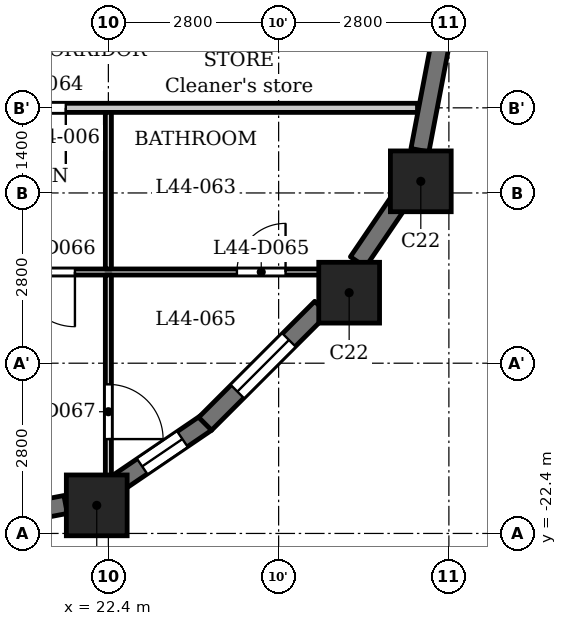
"""IFC4 building model, lengths in metres.
Left out: names, types, materials, properties, quantities, classifications, styles, units other than length and angle.
Written with IfcOpenShell. Run it as: python <this file> out.ifc"""

import sys

from ifc_helpers import new_model, si_unit, direction, frame, frame_2d, origin, origin_2d, place, context, subcontext, project, spatial, rectangle, extrude, element, fill, save


model = new_model("IFC4")
c1 = context("Model", 3, precision=1e-05, world=origin(), true_north=direction((0.0, 1.0)))
c2 = subcontext(c1, "Body", "Model", "MODEL_VIEW")
j1 = project(units=[si_unit("LENGTHUNIT", "METRE"), si_unit("PLANEANGLEUNIT", "RADIAN")], contexts=[c1])
p1 = place(None, origin())
s1 = spatial("IfcSite", under=j1, at=p1, CompositionType="ELEMENT")
p2 = place(p1, origin())
s2 = spatial("IfcBuilding", under=s1, at=p2, CompositionType="ELEMENT")
p3 = place(p2, frame((0.0, 0.0, 171.1)))
s3 = spatial("IfcBuildingStorey", under=s2, at=p3, CompositionType="ELEMENT", Elevation=171.1)
for number, where, z_axis, x_axis in (
    (1, (22.209, -21.938, 0.0), (0.0, 0.0, 1.0), (1.0, 0.0, 0.0)),
    (2, (26.36, -18.44, 0.0), (0.0, 0.0, 1.0), (1.0, 0.0, 0.0)),
    (3, (27.538, -16.609, 0.0), (0.0, 0.0, 1.0), (1.0, 0.0, 0.0)),
):
    element("IfcColumn", number, at=place(p3, frame(where, z_axis=z_axis, x_axis=x_axis)), inside=s3, PredefinedType="COLUMN", context=c2, shape_type="SweptSolid", body=[
        extrude(rectangle(XDim=1.0, YDim=1.0, at=origin_2d()), origin(), (0.0, 0.0, 1.0), 3.5),
    ])
p4 = place(p3, frame((19.972, -22.253, 0.0), z_axis=(0.0, 0.0, 1.0), x_axis=(0.982284988433, 0.187393173565, 0.0)))
e4 = element("IfcWall", 4, at=p4, inside=s3, PredefinedType="SOLIDWALL", context=c2, shape_type="SweptSolid", body=[
    extrude(rectangle(XDim=1.756, YDim=0.3, at=frame_2d((0.878, 0.0))), origin(), (0.0, 0.0, 1.0), 2.45),
])
p5 = place(p4, frame((0.478, 0.0, 0.6)))
e5 = element("IfcOpeningElement", 5, at=p5, cuts=e4, PredefinedType="OPENING", context=c2, shape_type="SweptSolid", body=[
    extrude(rectangle(XDim=0.8, YDim=1.55, at=frame_2d((0.4, 0.775))), frame((0.0, 0.16, 0.0), z_axis=(0.0, -1.0, 0.0), x_axis=(1.0, 0.0, 0.0)), (0.0, 0.0, 1.0), 0.32),
])
p6 = place(p3, frame((22.56, -21.566, 0.0), z_axis=(0.0, 0.0, 1.0), x_axis=(0.82707645233, 0.562089443061, 0.0)))
e6 = element("IfcWall", 6, at=p6, inside=s3, PredefinedType="SOLIDWALL", context=c2, shape_type="SweptSolid", body=[
    extrude(rectangle(XDim=1.756, YDim=0.3, at=frame_2d((0.878, 0.0))), origin(), (0.0, 0.0, 1.0), 2.45),
])
p7 = place(p6, frame((0.478, 0.0, 0.6)))
e7 = element("IfcOpeningElement", 7, at=p7, cuts=e6, PredefinedType="OPENING", context=c2, shape_type="SweptSolid", body=[
    extrude(rectangle(XDim=0.8, YDim=1.55, at=frame_2d((0.4, 0.775))), frame((0.0, 0.16, 0.0), z_axis=(0.0, -1.0, 0.0), x_axis=(1.0, 0.0, 0.0)), (0.0, 0.0, 1.0), 0.32),
])
p8 = place(p3, frame((23.991, -20.597, 0.0), z_axis=(0.0, 0.0, 1.0), x_axis=(0.707106781187, 0.707106781187, 0.0)))
e8 = element("IfcWall", 8, at=p8, inside=s3, PredefinedType="SOLIDWALL", context=c2, shape_type="SweptSolid", body=[
    extrude(rectangle(XDim=2.7, YDim=0.3, at=frame_2d((1.35, 0.0))), origin(), (0.0, 0.0, 1.0), 2.45),
])
p9 = place(p8, frame((0.75, 0.0, 0.6)))
e9 = element("IfcOpeningElement", 9, at=p9, cuts=e8, PredefinedType="OPENING", context=c2, shape_type="SweptSolid", body=[
    extrude(rectangle(XDim=1.2, YDim=1.55, at=frame_2d((0.6, 0.775))), frame((0.0, 0.16, 0.0), z_axis=(0.0, -1.0, 0.0), x_axis=(1.0, 0.0, 0.0)), (0.0, 0.0, 1.0), 0.32),
])
p10 = place(p3, frame((26.504, -17.934, 0.0), z_axis=(0.0, 0.0, 1.0), x_axis=(0.562145470373, 0.827038372833, 0.0)))
e10 = element("IfcWall", 10, at=p10, inside=s3, PredefinedType="SOLIDWALL", context=c2, shape_type="SweptSolid", body=[
    extrude(rectangle(XDim=1.177, YDim=0.3, at=frame_2d((0.588, 0.0))), origin(), (0.0, 0.0, 1.0), 3.2),
])
p11 = place(p3, frame((27.524, -16.097, 0.0), z_axis=(0.0, 0.0, 1.0), x_axis=(0.187259034321, 0.982310569049, 0.0)))
e11 = element("IfcWall", 11, at=p11, inside=s3, PredefinedType="SOLIDWALL", context=c2, shape_type="SweptSolid", body=[
    extrude(rectangle(XDim=1.756, YDim=0.3, at=frame_2d((0.878, 0.0))), origin(), (0.0, 0.0, 1.0), 2.45),
])
p12 = place(p3, frame((16.875, -18.1, 0.0), z_axis=(0.0, 0.0, 1.0), x_axis=(1.0, 0.0, 0.0)))
e12 = element("IfcWall", 12, at=p12, inside=s3, PredefinedType="PARTITIONING", context=c2, shape_type="SweptSolid", body=[
    extrude(rectangle(XDim=9.565, YDim=0.1, at=frame_2d((4.782, 0.0))), origin(), (0.0, 0.0, 1.0), 3.2),
])
p13 = place(p12, frame((7.639, 0.0, 0.0)))
e13 = element("IfcOpeningElement", 13, at=p13, cuts=e12, PredefinedType="OPENING", context=c2, shape_type="SweptSolid", body=[
    extrude(rectangle(XDim=0.8, YDim=2.1, at=frame_2d((0.4, 1.05))), frame((0.0, 0.06, 0.0), z_axis=(0.0, -1.0, 0.0), x_axis=(1.0, 0.0, 0.0)), (0.0, 0.0, 1.0), 0.12),
])
p14 = place(p12, frame((4.075, 0.0, 0.0)))
e14 = element("IfcOpeningElement", 14, at=p14, cuts=e12, PredefinedType="OPENING", context=c2, shape_type="SweptSolid", body=[
    extrude(rectangle(XDim=0.9, YDim=2.1, at=frame_2d((0.45, 1.05))), frame((0.0, 0.06, 0.0), z_axis=(0.0, -1.0, 0.0), x_axis=(1.0, 0.0, 0.0)), (0.0, 0.0, 1.0), 0.12),
])
p15 = place(p3, frame((14.925, -15.4, 0.0), z_axis=(0.0, 0.0, 1.0), x_axis=(1.0, 0.0, 0.0)))
e15 = element("IfcWall", 15, at=p15, inside=s3, PredefinedType="PARTITIONING", context=c2, shape_type="SweptSolid", body=[
    extrude(rectangle(XDim=12.559, YDim=0.15, at=frame_2d((6.279, 0.0))), origin(), (0.0, 0.0, 1.0), 3.2),
])
p16 = place(p15, frame((5.775, 0.0, 0.0)))
e16 = element("IfcOpeningElement", 16, at=p16, cuts=e15, PredefinedType="OPENING", context=c2, shape_type="SweptSolid", body=[
    extrude(rectangle(XDim=1.0, YDim=2.1, at=frame_2d((0.5, 1.05))), frame((0.0, 0.085, 0.0), z_axis=(0.0, -1.0, 0.0), x_axis=(1.0, 0.0, 0.0)), (0.0, 0.0, 1.0), 0.17),
])
p17 = place(p3, frame((22.4, -21.72, 0.0), z_axis=(0.0, 0.0, 1.0), x_axis=(0.0, 1.0, 0.0)))
e17 = element("IfcWall", 17, at=p17, inside=s3, PredefinedType="PARTITIONING", context=c2, shape_type="SweptSolid", body=[
    extrude(rectangle(XDim=3.57, YDim=0.1, at=frame_2d((1.785, 0.0))), origin(), (0.0, 0.0, 1.0), 3.2),
])
p18 = place(p17, frame((0.872, 0.0, 0.0)))
e18 = element("IfcOpeningElement", 18, at=p18, cuts=e17, PredefinedType="OPENING", context=c2, shape_type="SweptSolid", body=[
    extrude(rectangle(XDim=0.9, YDim=2.1, at=frame_2d((0.45, 1.05))), frame((0.0, 0.06, 0.0), z_axis=(0.0, -1.0, 0.0), x_axis=(1.0, 0.0, 0.0)), (0.0, 0.0, 1.0), 0.12),
])
p19 = place(p3, frame((22.4, -18.05, 0.0), z_axis=(0.0, 0.0, 1.0), x_axis=(0.0, 1.0, 0.0)))
e19 = element("IfcWall", 19, at=p19, inside=s3, PredefinedType="PARTITIONING", context=c2, shape_type="SweptSolid", body=[
    extrude(rectangle(XDim=2.575, YDim=0.1, at=frame_2d((1.288, 0.0))), origin(), (0.0, 0.0, 1.0), 3.2),
])
p20 = place(p16, origin())
e20 = element("IfcDoor", 20, at=p20, inside=s3, OperationType="SINGLE_SWING_RIGHT", PredefinedType="DOOR", context=c2, shape_type="SweptSolid", body=[
    extrude(rectangle(XDim=1.0, YDim=2.1, at=frame_2d((0.5, 1.05))), frame((0.0, 0.025, 0.0), z_axis=(0.0, -1.0, 0.0), x_axis=(1.0, 0.0, 0.0)), (0.0, 0.0, 1.0), 0.05),
])
fill(e16, e20)
p21 = place(p13, origin())
e21 = element("IfcDoor", 21, at=p21, inside=s3, OperationType="SINGLE_SWING_LEFT", PredefinedType="DOOR", context=c2, shape_type="SweptSolid", body=[
    extrude(rectangle(XDim=0.8, YDim=2.1, at=frame_2d((0.4, 1.05))), frame((0.0, 0.025, 0.0), z_axis=(0.0, -1.0, 0.0), x_axis=(1.0, 0.0, 0.0)), (0.0, 0.0, 1.0), 0.05),
])
fill(e13, e21)
p22 = place(p14, origin())
e22 = element("IfcDoor", 22, at=p22, inside=s3, OperationType="SINGLE_SWING_RIGHT", PredefinedType="DOOR", context=c2, shape_type="SweptSolid", body=[
    extrude(rectangle(XDim=0.9, YDim=2.1, at=frame_2d((0.45, 1.05))), frame((0.0, 0.025, 0.0), z_axis=(0.0, -1.0, 0.0), x_axis=(1.0, 0.0, 0.0)), (0.0, 0.0, 1.0), 0.05),
])
fill(e14, e22)
p23 = place(p18, origin())
e23 = element("IfcDoor", 23, at=p23, inside=s3, OperationType="SINGLE_SWING_LEFT", PredefinedType="DOOR", context=c2, shape_type="SweptSolid", body=[
    extrude(rectangle(XDim=0.9, YDim=2.1, at=frame_2d((0.45, 1.05))), frame((0.0, 0.025, 0.0), z_axis=(0.0, -1.0, 0.0), x_axis=(1.0, 0.0, 0.0)), (0.0, 0.0, 1.0), 0.05),
])
fill(e18, e23)
p24 = place(p7, origin())
e24 = element("IfcWindow", 24, at=p24, inside=s3, PartitioningType="SINGLE_PANEL", PredefinedType="WINDOW", context=c2, shape_type="SweptSolid", body=[
    extrude(rectangle(XDim=0.8, YDim=1.55, at=frame_2d((0.4, 0.775))), frame((0.0, 0.03, 0.0), z_axis=(0.0, -1.0, 0.0), x_axis=(1.0, 0.0, 0.0)), (0.0, 0.0, 1.0), 0.06),
])
fill(e7, e24)
p25 = place(p9, origin())
e25 = element("IfcWindow", 25, at=p25, inside=s3, PartitioningType="SINGLE_PANEL", PredefinedType="WINDOW", context=c2, shape_type="SweptSolid", body=[
    extrude(rectangle(XDim=1.2, YDim=1.55, at=frame_2d((0.6, 0.775))), frame((0.0, 0.03, 0.0), z_axis=(0.0, -1.0, 0.0), x_axis=(1.0, 0.0, 0.0)), (0.0, 0.0, 1.0), 0.06),
])
fill(e9, e25)
save(model, sys.argv[1])
